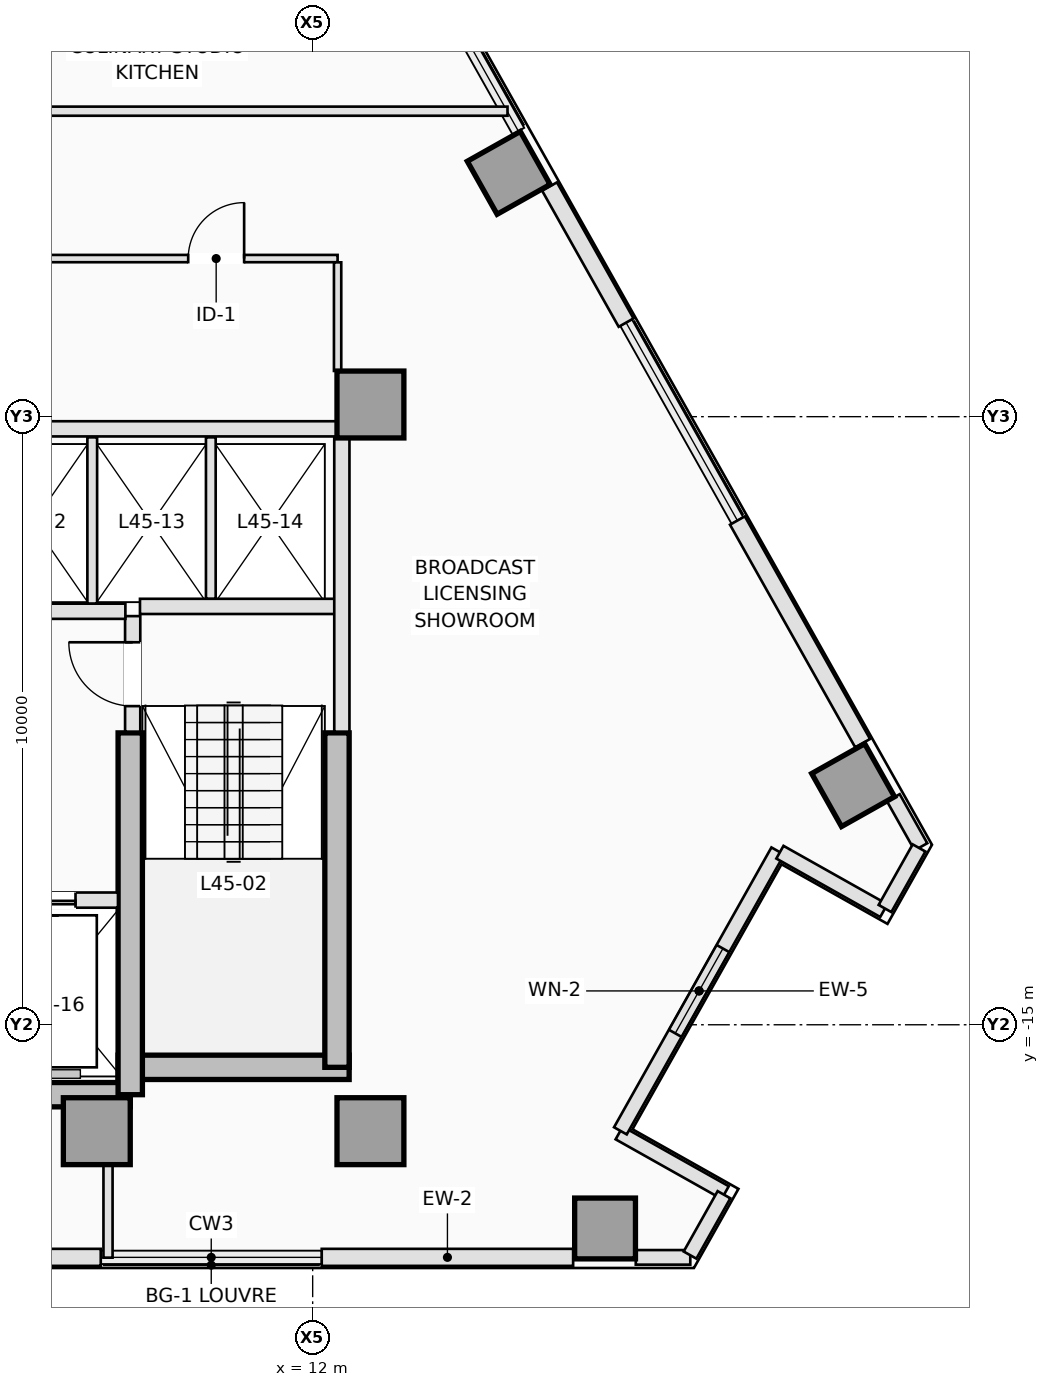
"""IFC4 building model, lengths in metres.
Left out: names, types, materials, properties, quantities, classifications, styles, units other than length and angle.
Written with IfcOpenShell. Run it as: python <this file> out.ifc"""

import sys

from ifc_helpers import new_model, si_unit, direction, frame, frame_2d, origin, origin_2d, place, context, subcontext, project, spatial, rectangle, extrude, element, fill, save


model = new_model("IFC4")
c1 = context("Model", 3, precision=1e-05, world=origin(), true_north=direction((0.0, 1.0)))
c2 = subcontext(c1, "Body", "Model", "MODEL_VIEW")
j1 = project(units=[si_unit("LENGTHUNIT", "METRE"), si_unit("PLANEANGLEUNIT", "RADIAN")], contexts=[c1])
p1 = place(None, origin())
s1 = spatial("IfcSite", under=j1, at=p1, CompositionType="ELEMENT")
p2 = place(p1, origin())
s2 = spatial("IfcBuilding", under=s1, at=p2, CompositionType="ELEMENT")
p3 = place(p2, frame((0.0, 0.0, 165.0)))
s3 = spatial("IfcBuildingStorey", under=s2, at=p3, CompositionType="ELEMENT", Elevation=165.0)
p4 = place(p3, frame((3.75, -16.15, 0.0), z_axis=(0.0, 0.0, 1.0), x_axis=(1.0, 0.0, 0.0)))
e1 = element("IfcWall", 1, at=p4, inside=s3, PredefinedType="SHEAR", context=c2, shape_type="SweptSolid", body=[
    extrude(rectangle(XDim=5.25, YDim=0.4, at=frame_2d((2.625, 0.0))), origin(), (0.0, 0.0, 1.0), 3.5),
])
p5 = place(p3, frame((8.8, -15.7, 0.0), z_axis=(0.0, 0.0, 1.0), x_axis=(1.0, 0.0, 0.0)))
e2 = element("IfcWall", 2, at=p5, inside=s3, PredefinedType="SHEAR", context=c2, shape_type="SweptSolid", body=[
    extrude(rectangle(XDim=3.8, YDim=0.4, at=frame_2d((1.9, 0.0))), origin(), (0.0, 0.0, 1.0), 3.5),
])
p6 = place(p3, frame((12.4, -15.7, 0.0), z_axis=(0.0, 0.0, 1.0), x_axis=(0.0, 1.0, 0.0)))
e3 = element("IfcWall", 3, at=p6, inside=s3, PredefinedType="SHEAR", context=c2, shape_type="SweptSolid", body=[
    extrude(rectangle(XDim=5.5, YDim=0.4, at=frame_2d((2.75, 0.0))), origin(), (0.0, 0.0, 1.0), 3.5),
])
p7 = place(p3, frame((9.0, -16.15, 0.0), z_axis=(0.0, 0.0, 1.0), x_axis=(0.0, 1.0, 0.0)))
e4 = element("IfcWall", 4, at=p7, inside=s3, PredefinedType="SHEAR", context=c2, shape_type="SweptSolid", body=[
    extrude(rectangle(XDim=5.95, YDim=0.4, at=frame_2d((2.975, 0.0))), origin(), (0.0, 0.0, 1.0), 3.5),
])
for number, where, z_axis, x_axis in (
    (5, (8.45, -16.75, 0.0), (0.0, 0.0, 1.0), (1.0, 0.0, 0.0)),
    (6, (12.95, -16.75, 0.0), (0.0, 0.0, 1.0), (1.0, 0.0, 0.0)),
    (7, (12.95, -4.8, 0.0), (0.0, 0.0, 1.0), (1.0, 0.0, 0.0)),
):
    element("IfcColumn", number, at=place(p3, frame(where, z_axis=z_axis, x_axis=x_axis)), inside=s3, PredefinedType="COLUMN", context=c2, shape_type="SweptSolid", body=[
        extrude(rectangle(XDim=1.1, YDim=1.1, at=origin_2d()), origin(), (0.0, 0.0, 1.0), 3.5),
    ])
for number, where, z_axis, x_axis in (
    (8, (16.808, -18.35, 0.0), (0.0, 0.0, 1.0), (0.0, 1.0, 0.0)),
    (9, (20.888, -11.06, 0.0), (0.0, 0.0, 1.0), (0.872, 0.49, 0.0)),
    (10, (15.224, -0.991, 0.0), (0.0, 0.0, 1.0), (0.872, 0.49, 0.0)),
):
    element("IfcColumn", number, at=place(p3, frame(where, z_axis=z_axis, x_axis=x_axis)), inside=s3, PredefinedType="COLUMN", context=c2, shape_type="SweptSolid", body=[
        extrude(rectangle(XDim=1.0, YDim=1.0, at=origin_2d()), origin(), (0.0, 0.0, 1.0), 3.5),
    ])
p8 = place(p3, frame((18.21, -18.825, 0.0), z_axis=(0.0, 0.0, 1.0), x_axis=(-1.0, 0.0, 0.0)))
e11 = element("IfcWall", 11, at=p8, inside=s3, PredefinedType="STANDARD", context=c2, shape_type="SweptSolid", body=[
    extrude(rectangle(XDim=0.896, YDim=0.24, at=frame_2d((0.448, 0.0))), origin(), (0.0, 0.0, 1.0), 3.25),
])
p9 = place(p3, frame((16.283, -18.825, 0.0), z_axis=(0.0, 0.0, 1.0), x_axis=(-1.0, 0.0, 0.0)))
e12 = element("IfcWall", 12, at=p9, inside=s3, PredefinedType="STANDARD", context=c2, shape_type="SweptSolid", body=[
    extrude(rectangle(XDim=4.135, YDim=0.28, at=frame_2d((2.067, 0.0))), origin(), (0.0, 0.0, 1.0), 3.25),
])
p10 = place(p3, frame((8.515, -18.825, 0.0), z_axis=(0.0, 0.0, 1.0), x_axis=(-1.0, 0.0, 0.0)))
e13 = element("IfcWall", 13, at=p10, inside=s3, PredefinedType="STANDARD", context=c2, shape_type="SweptSolid", body=[
    extrude(rectangle(XDim=2.509, YDim=0.28, at=frame_2d((1.254, 0.0))), origin(), (0.0, 0.0, 1.0), 3.25),
])
p11 = place(p3, frame((21.549, -11.267, 0.0), z_axis=(0.0, 0.0, 1.0), x_axis=(0.490248718924, -0.871582579905, 0.0)))
e14 = element("IfcWall", 14, at=p11, inside=s3, PredefinedType="STANDARD", context=c2, shape_type="SweptSolid", body=[
    extrude(rectangle(XDim=0.926, YDim=0.24, at=frame_2d((0.463, 0.0))), origin(), (0.0, 0.0, 1.0), 3.25),
])
p12 = place(p3, frame((15.896, -1.215, 0.0), z_axis=(0.0, 0.0, 1.0), x_axis=(0.490229640206, -0.871593311048, 0.0)))
e15 = element("IfcWall", 15, at=p12, inside=s3, PredefinedType="STANDARD", context=c2, shape_type="SweptSolid", body=[
    extrude(rectangle(XDim=2.568, YDim=0.28, at=frame_2d((1.284, 0.0))), origin(), (0.0, 0.0, 1.0), 3.25),
])
p13 = place(p3, frame((18.985, -6.708, 0.0), z_axis=(0.0, 0.0, 1.0), x_axis=(0.490230882965, -0.871592612054, 0.0)))
e16 = element("IfcWall", 16, at=p13, inside=s3, PredefinedType="STANDARD", context=c2, shape_type="SweptSolid", body=[
    extrude(rectangle(XDim=4.2, YDim=0.28, at=frame_2d((2.1, 0.0))), origin(), (0.0, 0.0, 1.0), 3.25),
])
p14 = place(p3, frame((18.784, -17.76, 0.0), z_axis=(0.0, 0.0, 1.0), x_axis=(-0.871536415941, 0.49033078191, 0.0)))
e17 = element("IfcWall", 17, at=p14, inside=s3, PredefinedType="STANDARD", context=c2, shape_type="SweptSolid", body=[
    extrude(rectangle(XDim=2.0, YDim=0.24, at=frame_2d((1.0, 0.0))), origin(), (0.0, 0.0, 1.0), 3.25),
])
p15 = place(p3, frame((17.06, -16.744, 0.0), z_axis=(0.0, 0.0, 1.0), x_axis=(0.490276606961, 0.871566892824, 0.0)))
e18 = element("IfcWall", 18, at=p15, inside=s3, PredefinedType="STANDARD", context=c2, shape_type="SweptSolid", body=[
    extrude(rectangle(XDim=5.28, YDim=0.24, at=frame_2d((2.64, 0.0))), origin(), (0.0, 0.0, 1.0), 3.25),
])
p16 = place(p15, frame((1.84, 0.0, 0.9)))
e19 = element("IfcOpeningElement", 19, at=p16, cuts=e18, PredefinedType="OPENING", context=c2, shape_type="SweptSolid", body=[
    extrude(rectangle(XDim=1.6, YDim=2.1, at=frame_2d((0.8, 1.05))), frame((0.0, 0.13, 0.0), z_axis=(0.0, -1.0, 0.0), x_axis=(1.0, 0.0, 0.0)), (0.0, 0.0, 1.0), 0.26),
])
p17 = place(p3, frame((19.684, -12.162, 0.0), z_axis=(0.0, 0.0, 1.0), x_axis=(0.871512328312, -0.490373593906, 0.0)))
e20 = element("IfcWall", 20, at=p17, inside=s3, PredefinedType="STANDARD", context=c2, shape_type="SweptSolid", body=[
    extrude(rectangle(XDim=1.96, YDim=0.24, at=frame_2d((0.98, 0.0))), origin(), (0.0, 0.0, 1.0), 3.25),
])
p18 = place(p3, frame((21.412, -13.088, 0.0), z_axis=(0.0, 0.0, 1.0), x_axis=(0.4900989379, 0.871666811958, 0.0)))
e21 = element("IfcWall", 21, at=p18, inside=s3, PredefinedType="STANDARD", context=c2, shape_type="SweptSolid", body=[
    extrude(rectangle(XDim=1.143, YDim=0.24, at=frame_2d((0.571, 0.0))), origin(), (0.0, 0.0, 1.0), 3.25),
])
p19 = place(p3, frame((18.206, -18.788, 0.0), z_axis=(0.0, 0.0, 1.0), x_axis=(0.490403700594, 0.871495387506, 0.0)))
e22 = element("IfcWall", 22, at=p19, inside=s3, PredefinedType="STANDARD", context=c2, shape_type="SweptSolid", body=[
    extrude(rectangle(XDim=1.139, YDim=0.24, at=frame_2d((0.57, 0.0))), origin(), (0.0, 0.0, 1.0), 3.25),
])
p20 = place(p3, frame((9.04, -10.18, 0.0), z_axis=(0.0, 0.0, 1.0), x_axis=(0.0, 1.0, 0.0)))
e23 = element("IfcWall", 23, at=p20, inside=s3, PredefinedType="PARTITIONING", context=c2, shape_type="SweptSolid", body=[
    extrude(rectangle(XDim=1.9, YDim=0.25, at=frame_2d((0.95, 0.0))), origin(), (0.0, 0.0, 1.0), 3.25),
])
p21 = place(p20, frame((0.42, 0.0, 0.0)))
e24 = element("IfcOpeningElement", 24, at=p21, cuts=e23, PredefinedType="OPENING", context=c2, shape_type="SweptSolid", body=[
    extrude(rectangle(XDim=1.05, YDim=2.15, at=frame_2d((0.525, 1.075))), frame((0.0, 0.135, 0.0), z_axis=(0.0, -1.0, 0.0), x_axis=(1.0, 0.0, 0.0)), (0.0, 0.0, 1.0), 0.27),
])
p22 = place(p3, frame((9.16, -8.12, 0.0), z_axis=(0.0, 0.0, 1.0), x_axis=(1.0, 0.0, 0.0)))
e25 = element("IfcWall", 25, at=p22, inside=s3, PredefinedType="PARTITIONING", context=c2, shape_type="SweptSolid", body=[
    extrude(rectangle(XDim=3.22, YDim=0.25, at=frame_2d((1.61, 0.0))), origin(), (0.0, 0.0, 1.0), 3.25),
])
p23 = place(p3, frame((12.48, -10.18, 0.0), z_axis=(0.0, 0.0, 1.0), x_axis=(0.0, 1.0, 0.0)))
e26 = element("IfcWall", 26, at=p23, inside=s3, PredefinedType="PARTITIONING", context=c2, shape_type="SweptSolid", body=[
    extrude(rectangle(XDim=4.828, YDim=0.25, at=frame_2d((2.414, 0.0))), origin(), (0.0, 0.0, 1.0), 3.25),
])
p24 = place(p3, frame((3.68, -12.95, 0.0), z_axis=(0.0, 0.0, 1.0), x_axis=(1.0, 0.0, 0.0)))
e27 = element("IfcWall", 27, at=p24, inside=s3, PredefinedType="PARTITIONING", context=c2, shape_type="SweptSolid", body=[
    extrude(rectangle(XDim=5.118, YDim=0.25, at=frame_2d((2.559, 0.0))), origin(), (0.0, 0.0, 1.0), 3.25),
])
p25 = place(p24, frame((3.32, 0.0, 0.0)))
e28 = element("IfcOpeningElement", 28, at=p25, cuts=e27, PredefinedType="OPENING", context=c2, shape_type="SweptSolid", body=[
    extrude(rectangle(XDim=1.1, YDim=2.15, at=frame_2d((0.55, 1.075))), frame((0.0, 0.135, 0.0), z_axis=(0.0, -1.0, 0.0), x_axis=(1.0, 0.0, 0.0)), (0.0, 0.0, 1.0), 0.27),
])
p26 = place(p24, frame((0.67, 0.0, 0.0)))
e29 = element("IfcOpeningElement", 29, at=p26, cuts=e27, PredefinedType="OPENING", context=c2, shape_type="SweptSolid", body=[
    extrude(rectangle(XDim=1.2, YDim=2.15, at=frame_2d((0.6, 1.075))), frame((0.0, 0.135, 0.0), z_axis=(0.0, -1.0, 0.0), x_axis=(1.0, 0.0, 0.0)), (0.0, 0.0, 1.0), 0.27),
])
p27 = place(p3, frame((3.68, -8.2, 0.0), z_axis=(0.0, 0.0, 1.0), x_axis=(1.0, 0.0, 0.0)))
e30 = element("IfcWall", 30, at=p27, inside=s3, PredefinedType="PARTITIONING", context=c2, shape_type="SweptSolid", body=[
    extrude(rectangle(XDim=5.24, YDim=0.25, at=frame_2d((2.62, 0.0))), origin(), (0.0, 0.0, 1.0), 3.25),
])
p28 = place(p3, frame((4.302, -5.2, 0.0), z_axis=(0.0, 0.0, 1.0), x_axis=(1.0, 0.0, 0.0)))
e31 = element("IfcWall", 31, at=p28, inside=s3, PredefinedType="PARTITIONING", context=c2, shape_type="SweptSolid", body=[
    extrude(rectangle(XDim=8.096, YDim=0.25, at=frame_2d((4.048, 0.0))), origin(), (0.0, 0.0, 1.0), 3.25),
])
p29 = place(p3, frame((8.375, -8.073, 0.0), z_axis=(0.0, 0.0, 1.0), x_axis=(0.0, 1.0, 0.0)))
e32 = element("IfcWall", 32, at=p29, inside=s3, PredefinedType="PARTITIONING", context=c2, shape_type="SweptSolid", body=[
    extrude(rectangle(XDim=2.733, YDim=0.16, at=frame_2d((1.366, 0.0))), origin(), (0.0, 0.0, 1.0), 3.25),
])
p30 = place(p3, frame((10.325, -7.993, 0.0), z_axis=(0.0, 0.0, 1.0), x_axis=(0.0, 1.0, 0.0)))
e33 = element("IfcWall", 33, at=p30, inside=s3, PredefinedType="PARTITIONING", context=c2, shape_type="SweptSolid", body=[
    extrude(rectangle(XDim=2.653, YDim=0.16, at=frame_2d((1.326, 0.0))), origin(), (0.0, 0.0, 1.0), 3.25),
])
p31 = place(p3, frame((6.512, -2.4, 0.0), z_axis=(0.0, 0.0, 1.0), x_axis=(1.0, 0.0, 0.0)))
e34 = element("IfcWall", 34, at=p31, inside=s3, PredefinedType="PARTITIONING", context=c2, shape_type="SweptSolid", body=[
    extrude(rectangle(XDim=5.898, YDim=0.12, at=frame_2d((2.949, 0.0))), origin(), (0.0, 0.0, 1.0), 3.25),
])
p32 = place(p31, frame((3.441, 0.0, 0.0)))
e35 = element("IfcOpeningElement", 35, at=p32, cuts=e34, PredefinedType="OPENING", context=c2, shape_type="SweptSolid", body=[
    extrude(rectangle(XDim=0.92, YDim=2.12, at=frame_2d((0.46, 1.06))), frame((0.0, 0.07, 0.0), z_axis=(0.0, -1.0, 0.0), x_axis=(1.0, 0.0, 0.0)), (0.0, 0.0, 1.0), 0.14),
])
p33 = place(p3, frame((12.41, -2.462, 0.0), z_axis=(0.0, 0.0, 1.0), x_axis=(0.0, -1.0, 0.0)))
e36 = element("IfcWall", 36, at=p33, inside=s3, PredefinedType="PARTITIONING", context=c2, shape_type="SweptSolid", body=[
    extrude(rectangle(XDim=1.786, YDim=0.12, at=frame_2d((0.893, 0.0))), origin(), (0.0, 0.0, 1.0), 3.25),
])
p34 = place(p3, frame((15.204, 0.024, 0.0), z_axis=(0.0, 0.0, 1.0), x_axis=(-1.0, 0.0, 0.0)))
e37 = element("IfcWall", 37, at=p34, inside=s3, PredefinedType="PARTITIONING", context=c2, shape_type="SweptSolid", body=[
    extrude(rectangle(XDim=8.634, YDim=0.15, at=frame_2d((4.317, 0.0))), origin(), (0.0, 0.0, 1.0), 3.25),
])
p35 = place(p3, frame((8.635, -18.83, 0.0), z_axis=(0.0, 0.0, 1.0), x_axis=(0.0, 1.0, 0.0)))
e38 = element("IfcWall", 38, at=p35, inside=s3, PredefinedType="PARTITIONING", context=c2, shape_type="SweptSolid", body=[
    extrude(rectangle(XDim=1.528, YDim=0.15, at=frame_2d((0.764, 0.0))), origin(), (0.0, 0.0, 1.0), 3.25),
])
p36 = place(p16, origin())
e39 = element("IfcWindow", 39, at=p36, inside=s3, PartitioningType="SINGLE_PANEL", PredefinedType="WINDOW", context=c2, shape_type="SweptSolid", body=[
    extrude(rectangle(XDim=1.6, YDim=2.1, at=frame_2d((0.8, 1.05))), frame((0.0, 0.03, 0.0), z_axis=(0.0, -1.0, 0.0), x_axis=(1.0, 0.0, 0.0)), (0.0, 0.0, 1.0), 0.06),
])
fill(e19, e39)
p37 = place(p25, origin())
e40 = element("IfcDoor", 40, at=p37, inside=s3, OperationType="SLIDING_TO_RIGHT", PredefinedType="DOOR", context=c2, shape_type="SweptSolid", body=[
    extrude(rectangle(XDim=1.1, YDim=2.15, at=frame_2d((0.55, 1.075))), frame((0.0, 0.025, 0.0), z_axis=(0.0, -1.0, 0.0), x_axis=(1.0, 0.0, 0.0)), (0.0, 0.0, 1.0), 0.05),
])
fill(e28, e40)
p38 = place(p21, origin())
e41 = element("IfcDoor", 41, at=p38, inside=s3, OperationType="SINGLE_SWING_RIGHT", PredefinedType="DOOR", context=c2, shape_type="SweptSolid", body=[
    extrude(rectangle(XDim=1.05, YDim=2.15, at=frame_2d((0.525, 1.075))), frame((0.0, 0.025, 0.0), z_axis=(0.0, -1.0, 0.0), x_axis=(1.0, 0.0, 0.0)), (0.0, 0.0, 1.0), 0.05),
])
fill(e24, e41)
p39 = place(p32, origin())
e42 = element("IfcDoor", 42, at=p39, inside=s3, OperationType="SINGLE_SWING_RIGHT", PredefinedType="DOOR", context=c2, shape_type="SweptSolid", body=[
    extrude(rectangle(XDim=0.92, YDim=2.12, at=frame_2d((0.46, 1.06))), frame((0.0, 0.025, 0.0), z_axis=(0.0, -1.0, 0.0), x_axis=(1.0, 0.0, 0.0)), (0.0, 0.0, 1.0), 0.05),
])
fill(e35, e42)
save(model, sys.argv[1])
